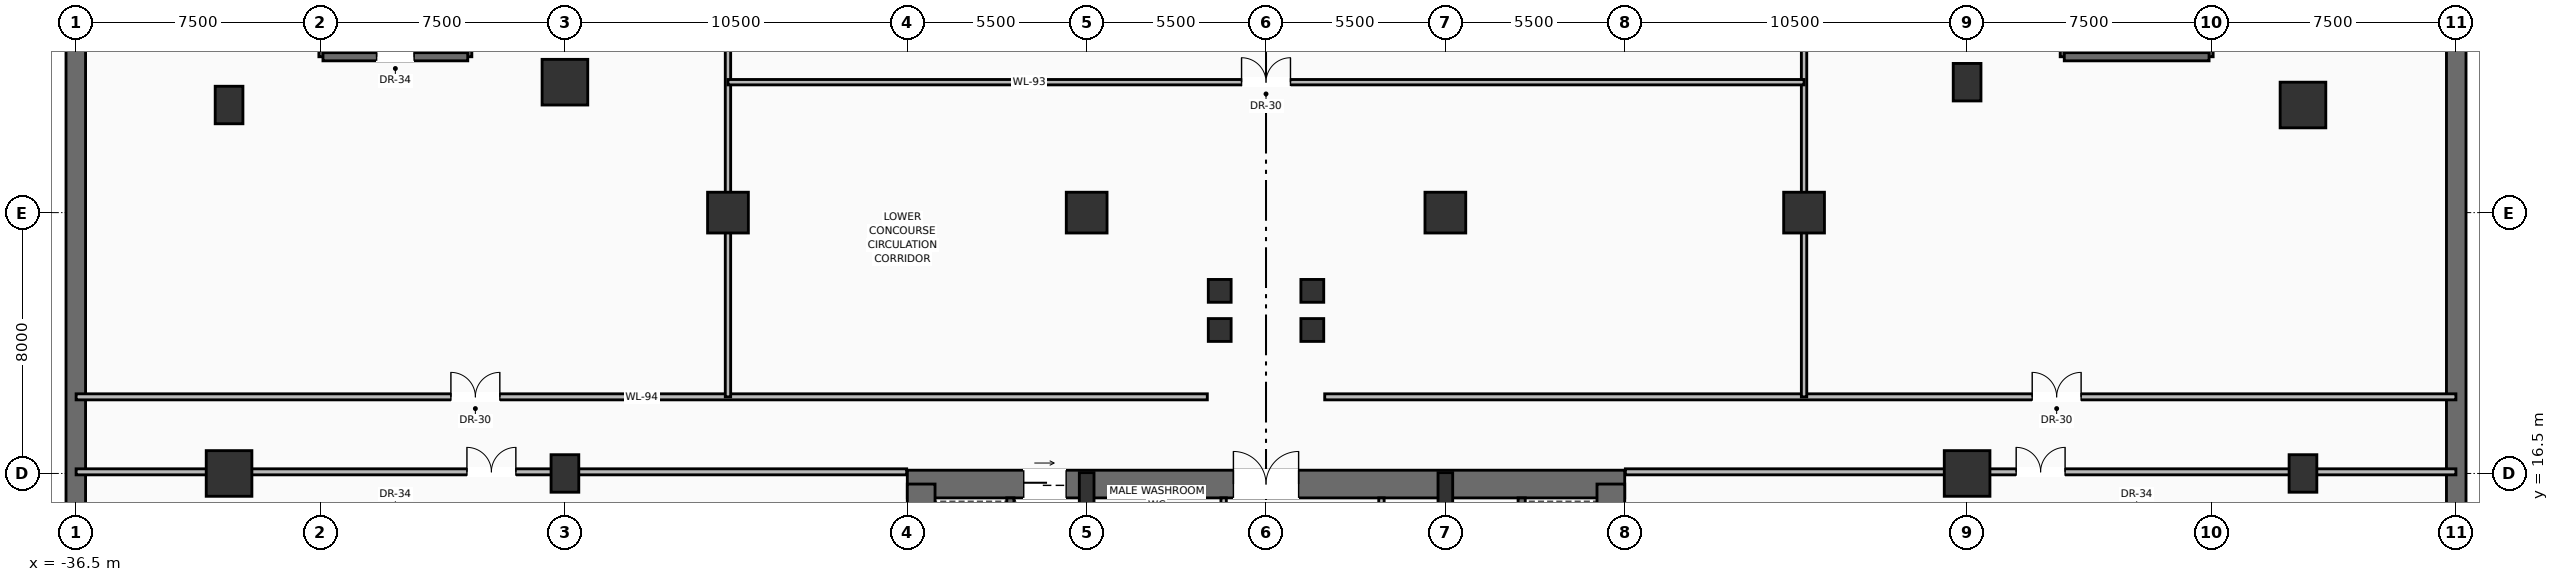
"""IFC4 building model, lengths in metres.
Left out: names, types, materials, properties, quantities, classifications, styles, units other than length and angle.
Written with IfcOpenShell. Run it as: python <this file> out.ifc"""

import sys

from ifc_helpers import new_model, si_unit, direction, frame, frame_2d, origin, origin_2d, place, context, subcontext, project, spatial, rectangle, hollow_rectangle, extrude, source, transform, mapped, element, fill, save


model = new_model("IFC4")
c1 = context("Model", 3, precision=1e-05, world=origin(), true_north=direction((0.0, 1.0)))
c2 = subcontext(c1, "Body", "Model", "MODEL_VIEW")
j1 = project(units=[si_unit("LENGTHUNIT", "METRE"), si_unit("PLANEANGLEUNIT", "RADIAN")], contexts=[c1])
p1 = place(None, origin())
s1 = spatial("IfcSite", under=j1, at=p1, CompositionType="ELEMENT")
p2 = place(p1, origin())
s2 = spatial("IfcBuilding", under=s1, at=p2, CompositionType="ELEMENT")
p3 = place(p2, frame((0.0, 0.0, -5.0)))
s3 = spatial("IfcBuildingStorey", under=s2, at=p3, CompositionType="ELEMENT", Elevation=-5.0)
for number, where, z_axis, x_axis in (
    (1, (36.5, 4.0, 0.0), (0.0, 0.0, 1.0), (0.0, 1.0, 0.0)),
    (2, (-36.5, 46.0, 0.0), (0.0, 0.0, 1.0), (0.0, -1.0, 0.0)),
):
    element("IfcWall", number, at=place(p3, frame(where, z_axis=z_axis, x_axis=x_axis)), inside=s3, PredefinedType="SOLIDWALL", context=c2, shape_type="SweptSolid", body=[
        extrude(rectangle(XDim=42.0, YDim=0.6, at=frame_2d((21.0, 0.0))), origin(), (0.0, 0.0, 1.0), 4.64),
    ])
p4 = place(p3, frame((-11.0, 16.175, 0.0), z_axis=(0.0, 0.0, 1.0), x_axis=(1.0, 0.0, 0.0)))
e3 = element("IfcWall", 3, at=p4, inside=s3, PredefinedType="SHEAR", context=c2, shape_type="SweptSolid", body=[
    extrude(rectangle(XDim=22.0, YDim=0.85, at=frame_2d((11.0, 0.0))), origin(), (0.0, 0.0, 1.0), 4.64),
])
p5 = place(p4, frame((3.57, 0.0, 0.0)))
e4 = element("IfcOpeningElement", 4, at=p5, cuts=e3, PredefinedType="OPENING", context=c2, shape_type="SweptSolid", body=[
    extrude(rectangle(XDim=1.3, YDim=2.3, at=frame_2d((0.65, 1.15))), frame((0.0, 0.435, 0.0), z_axis=(0.0, -1.0, 0.0), x_axis=(1.0, 0.0, 0.0)), (0.0, 0.0, 1.0), 0.87),
])
p6 = place(p4, frame((10.0, 0.0, 0.0)))
e5 = element("IfcOpeningElement", 5, at=p6, cuts=e3, PredefinedType="OPENING", context=c2, shape_type="SweptSolid", body=[
    extrude(rectangle(XDim=2.0, YDim=2.4, at=frame_2d((1.0, 1.2))), frame((0.0, 0.435, 0.0), z_axis=(0.0, -1.0, 0.0), x_axis=(1.0, 0.0, 0.0)), (0.0, 0.0, 1.0), 0.87),
])
for number, where, z_axis, x_axis in (
    (6, (-10.575, 0.425, 0.0), (0.0, 0.0, 1.0), (0.0, 1.0, 0.0)),
    (7, (10.575, 0.425, 0.0), (0.0, 0.0, 1.0), (0.0, 1.0, 0.0)),
):
    element("IfcWall", number, at=place(p3, frame(where, z_axis=z_axis, x_axis=x_axis)), inside=s3, PredefinedType="SHEAR", context=c2, shape_type="SweptSolid", body=[
        extrude(rectangle(XDim=15.75, YDim=0.85, at=frame_2d((7.875, 0.0))), origin(), (0.0, 0.0, 1.0), 4.64),
    ])
p7 = place(p3, frame((-5.5, 0.425, 0.0), z_axis=(0.0, 0.0, 1.0), x_axis=(0.0, 1.0, 0.0)))
e8 = element("IfcWall", 8, at=p7, inside=s3, PredefinedType="SHEAR", context=c2, shape_type="SweptSolid", body=[
    extrude(rectangle(XDim=15.75, YDim=0.4, at=frame_2d((7.875, 0.0))), origin(), (0.0, 0.0, 1.0), 4.64),
])
p8 = place(p7, frame((9.075, 0.0, 0.0)))
e9 = element("IfcOpeningElement", 9, at=p8, cuts=e8, PredefinedType="OPENING", context=c2, shape_type="SweptSolid", body=[
    extrude(rectangle(XDim=1.1, YDim=2.2, at=frame_2d((0.55, 1.1))), frame((0.0, 0.21, 0.0), z_axis=(0.0, -1.0, 0.0), x_axis=(1.0, 0.0, 0.0)), (0.0, 0.0, 1.0), 0.42),
])
p9 = place(p3, frame((5.5, 0.425, 0.0), z_axis=(0.0, 0.0, 1.0), x_axis=(0.0, 1.0, 0.0)))
e10 = element("IfcWall", 10, at=p9, inside=s3, PredefinedType="SHEAR", context=c2, shape_type="SweptSolid", body=[
    extrude(rectangle(XDim=15.75, YDim=0.4, at=frame_2d((7.875, 0.0))), origin(), (0.0, 0.0, 1.0), 4.64),
])
p10 = place(p9, frame((9.075, 0.0, 0.0)))
e11 = element("IfcOpeningElement", 11, at=p10, cuts=e10, PredefinedType="OPENING", context=c2, shape_type="SweptSolid", body=[
    extrude(rectangle(XDim=1.1, YDim=2.2, at=frame_2d((0.55, 1.1))), frame((0.0, 0.21, 0.0), z_axis=(0.0, -1.0, 0.0), x_axis=(1.0, 0.0, 0.0)), (0.0, 0.0, 1.0), 0.42),
])
m1 = source(origin(), c2, "Body", "SweptSolid", [
    extrude(rectangle(XDim=0.45, YDim=0.95, at=origin_2d()), origin(), (0.0, 0.0, 1.0), 5.0),
])
for number, where, z_axis, x_axis in (
    (12, (-5.5, 16.05, 0.0), (0.0, 0.0, 1.0), (1.0, 0.0, 0.0)),
    (13, (5.5, 16.05, 0.0), (0.0, 0.0, 1.0), (1.0, 0.0, 0.0)),
):
    element("IfcColumn", number, at=place(p3, frame(where, z_axis=z_axis, x_axis=x_axis)), inside=s3, PredefinedType="PILASTER", context=c2, shape_type="MappedRepresentation", body=[
        mapped(m1, transform((0.0, 0.0, 0.0), scale=1.0)),
    ])
m2 = source(origin(), c2, "Body", "SweptSolid", [
    extrude(hollow_rectangle(XDim=0.7, YDim=0.7, WallThickness=0.036, at=origin_2d()), origin(), (0.0, 0.0, 1.0), 5.0),
])
for number, where, z_axis, x_axis in (
    (14, (-1.42, 20.9, 0.0), (0.0, 0.0, 1.0), (1.0, 0.0, 0.0)),
    (15, (1.42, 20.9, 0.0), (0.0, 0.0, 1.0), (1.0, 0.0, 0.0)),
    (16, (-1.42, 22.1, 0.0), (0.0, 0.0, 1.0), (1.0, 0.0, 0.0)),
    (17, (1.42, 22.1, 0.0), (0.0, 0.0, 1.0), (1.0, 0.0, 0.0)),
):
    element("IfcColumn", number, at=place(p3, frame(where, z_axis=z_axis, x_axis=x_axis)), inside=s3, PredefinedType="COLUMN", context=c2, shape_type="MappedRepresentation", body=[
        mapped(m2, transform((0.0, 0.0, 0.0), scale=1.0)),
    ])
m3 = source(origin(), c2, "Body", "SweptSolid", [
    extrude(hollow_rectangle(XDim=1.4, YDim=1.4, WallThickness=0.07, at=origin_2d()), origin(), (0.0, 0.0, 1.0), 5.0),
])
p11 = place(p3, frame((-31.8, 16.5, 0.0), z_axis=(0.0, 0.0, 1.0), x_axis=(1.0, 0.0, 0.0)))
e18 = element("IfcColumn", 18, at=p11, inside=s3, PredefinedType="COLUMN", context=c2, shape_type="MappedRepresentation", body=[
    mapped(m3, transform((0.0, 0.0, 0.0), scale=1.0)),
])
m4 = source(origin(), c2, "Body", "SweptSolid", [
    extrude(rectangle(XDim=0.85, YDim=1.15, at=origin_2d()), origin(), (0.0, 0.0, 1.0), 5.0),
])
p12 = place(p3, frame((31.8, 16.5, 0.0), z_axis=(0.0, 0.0, 1.0), x_axis=(1.0, 0.0, 0.0)))
e19 = element("IfcColumn", 19, at=p12, inside=s3, PredefinedType="COLUMN", context=c2, shape_type="MappedRepresentation", body=[
    mapped(m4, transform((0.0, 0.0, 0.0), scale=1.0)),
])
p13 = place(p3, frame((-21.5, 28.5, 0.0), z_axis=(0.0, 0.0, 1.0), x_axis=(1.0, 0.0, 0.0)))
e20 = element("IfcColumn", 20, at=p13, inside=s3, PredefinedType="COLUMN", context=c2, shape_type="MappedRepresentation", body=[
    mapped(m3, transform((0.0, 0.0, 0.0), scale=1.0)),
])
for number, where, z_axis, x_axis in (
    (21, (21.5, 28.5, 0.0), (0.0, 0.0, 1.0), (1.0, 0.0, 0.0)),
    (22, (-21.5, 16.5, 0.0), (0.0, 0.0, 1.0), (1.0, 0.0, 0.0)),
):
    element("IfcColumn", number, at=place(p3, frame(where, z_axis=z_axis, x_axis=x_axis)), inside=s3, PredefinedType="COLUMN", context=c2, shape_type="MappedRepresentation", body=[
        mapped(m4, transform((0.0, 0.0, 0.0), scale=1.0)),
    ])
p14 = place(p3, frame((21.5, 16.5, 0.0), z_axis=(0.0, 0.0, 1.0), x_axis=(1.0, 0.0, 0.0)))
e23 = element("IfcColumn", 23, at=p14, inside=s3, PredefinedType="COLUMN", context=c2, shape_type="MappedRepresentation", body=[
    mapped(m3, transform((0.0, 0.0, 0.0), scale=1.0)),
])
p15 = place(p3, frame((-31.8, 27.8, 0.0), z_axis=(0.0, 0.0, 1.0), x_axis=(1.0, 0.0, 0.0)))
e24 = element("IfcColumn", 24, at=p15, inside=s3, PredefinedType="COLUMN", context=c2, shape_type="MappedRepresentation", body=[
    mapped(m4, transform((0.0, 0.0, 0.0), scale=1.0)),
])
p16 = place(p3, frame((31.8, 27.8, 0.0), z_axis=(0.0, 0.0, 1.0), x_axis=(1.0, 0.0, 0.0)))
e25 = element("IfcColumn", 25, at=p16, inside=s3, PredefinedType="COLUMN", context=c2, shape_type="MappedRepresentation", body=[
    mapped(m3, transform((0.0, 0.0, 0.0), scale=1.0)),
])
m5 = source(origin(), c2, "Body", "SweptSolid", [
    extrude(rectangle(XDim=1.25, YDim=1.25, at=origin_2d()), origin(), (0.0, 0.0, 1.0), 5.0),
])
for number, where, z_axis, x_axis in (
    (26, (-5.5, 24.5, 0.0), (0.0, 0.0, 1.0), (1.0, 0.0, 0.0)),
    (27, (5.5, 24.5, 0.0), (0.0, 0.0, 1.0), (1.0, 0.0, 0.0)),
):
    element("IfcColumn", number, at=place(p3, frame(where, z_axis=z_axis, x_axis=x_axis)), inside=s3, PredefinedType="COLUMN", context=c2, shape_type="MappedRepresentation", body=[
        mapped(m5, transform((0.0, 0.0, 0.0), scale=1.0)),
    ])
m6 = source(origin(), c2, "Body", "SweptSolid", [
    extrude(rectangle(XDim=1.25, YDim=1.25, at=origin_2d()), origin(), (0.0, 0.0, 1.0), 4.64),
])
for number, where, z_axis, x_axis in (
    (28, (-16.5, 24.5, 0.0), (0.0, 0.0, 1.0), (1.0, 0.0, 0.0)),
    (29, (16.5, 24.5, 0.0), (0.0, 0.0, 1.0), (1.0, 0.0, 0.0)),
):
    element("IfcColumn", number, at=place(p3, frame(where, z_axis=z_axis, x_axis=x_axis)), inside=s3, PredefinedType="COLUMN", context=c2, shape_type="MappedRepresentation", body=[
        mapped(m6, transform((0.0, 0.0, 0.0), scale=1.0)),
    ])
for number, where, z_axis, x_axis in (
    (30, (-7.84, 11.87, 0.0), (0.0, 0.0, 1.0), (0.0, 1.0, 0.0)),
    (31, (7.84, 11.87, 0.0), (0.0, 0.0, 1.0), (0.0, 1.0, 0.0)),
):
    element("IfcWall", number, at=place(p3, frame(where, z_axis=z_axis, x_axis=x_axis)), inside=s3, PredefinedType="SOLIDWALL", context=c2, shape_type="SweptSolid", body=[
        extrude(rectangle(XDim=3.88, YDim=0.22, at=frame_2d((1.94, 0.0))), origin(), (0.0, 0.0, 1.0), 4.64),
    ])
p17 = place(p3, frame((-1.3, 13.6, 0.0), z_axis=(0.0, 0.0, 1.0), x_axis=(0.0, 1.0, 0.0)))
e32 = element("IfcWall", 32, at=p17, inside=s3, PredefinedType="PARTITIONING", context=c2, shape_type="SweptSolid", body=[
    extrude(rectangle(XDim=2.15, YDim=0.165, at=frame_2d((1.075, 0.0))), origin(), (0.0, 0.0, 1.0), 4.632),
])
p18 = place(p17, frame((0.55, 0.0, 0.0)))
e33 = element("IfcOpeningElement", 33, at=p18, cuts=e32, PredefinedType="OPENING", context=c2, shape_type="SweptSolid", body=[
    extrude(rectangle(XDim=0.9, YDim=2.1, at=frame_2d((0.45, 1.05))), frame((0.0, 0.093, 0.0), z_axis=(0.0, -1.0, 0.0), x_axis=(1.0, 0.0, 0.0)), (0.0, 0.0, 1.0), 0.185),
])
p19 = place(p3, frame((3.54, 11.22, 0.0), z_axis=(0.0, 0.0, 1.0), x_axis=(0.0, 1.0, 0.0)))
e34 = element("IfcWall", 34, at=p19, inside=s3, PredefinedType="PARTITIONING", context=c2, shape_type="SweptSolid", body=[
    extrude(rectangle(XDim=4.53, YDim=0.165, at=frame_2d((2.265, 0.0))), origin(), (0.0, 0.0, 1.0), 4.632),
])
p20 = place(p19, frame((1.25, 0.0, 0.0)))
e35 = element("IfcOpeningElement", 35, at=p20, cuts=e34, PredefinedType="OPENING", context=c2, shape_type="SweptSolid", body=[
    extrude(rectangle(XDim=0.9, YDim=2.1, at=frame_2d((0.45, 1.05))), frame((0.0, 0.093, 0.0), z_axis=(0.0, -1.0, 0.0), x_axis=(1.0, 0.0, 0.0)), (0.0, 0.0, 1.0), 0.185),
])
for number, where, z_axis, x_axis in (
    (36, (-28.92, 29.28, 0.0), (0.0, 0.0, 1.0), (0.0, 1.0, 0.0)),
    (37, (-24.48, 29.28, 0.0), (0.0, 0.0, 1.0), (0.0, 1.0, 0.0)),
):
    element("IfcWall", number, at=place(p3, frame(where, z_axis=z_axis, x_axis=x_axis)), inside=s3, PredefinedType="SOLIDWALL", context=c2, shape_type="SweptSolid", body=[
        extrude(rectangle(XDim=8.44, YDim=0.25, at=frame_2d((4.22, 0.0))), origin(), (0.0, 0.0, 1.0), 4.64),
    ])
p21 = place(p3, frame((-28.92, 29.28, 0.0), z_axis=(0.0, 0.0, 1.0), x_axis=(1.0, 0.0, 0.0)))
e38 = element("IfcWall", 38, at=p21, inside=s3, PredefinedType="SOLIDWALL", context=c2, shape_type="SweptSolid", body=[
    extrude(rectangle(XDim=4.44, YDim=0.25, at=frame_2d((2.22, 0.0))), origin(), (0.0, 0.0, 1.0), 4.64),
])
p22 = place(p21, frame((1.645, 0.0, 0.0)))
e39 = element("IfcOpeningElement", 39, at=p22, cuts=e38, PredefinedType="OPENING", context=c2, shape_type="SweptSolid", body=[
    extrude(rectangle(XDim=1.15, YDim=2.2, at=frame_2d((0.575, 1.1))), frame((0.0, 0.135, 0.0), z_axis=(0.0, -1.0, 0.0), x_axis=(1.0, 0.0, 0.0)), (0.0, 0.0, 1.0), 0.27),
])
for number, where, z_axis, x_axis in (
    (40, (24.48, 29.28, 0.0), (0.0, 0.0, 1.0), (0.0, 1.0, 0.0)),
    (41, (28.92, 29.28, 0.0), (0.0, 0.0, 1.0), (0.0, 1.0, 0.0)),
):
    element("IfcWall", number, at=place(p3, frame(where, z_axis=z_axis, x_axis=x_axis)), inside=s3, PredefinedType="SOLIDWALL", context=c2, shape_type="SweptSolid", body=[
        extrude(rectangle(XDim=8.44, YDim=0.25, at=frame_2d((4.22, 0.0))), origin(), (0.0, 0.0, 1.0), 4.64),
    ])
p23 = place(p3, frame((24.48, 29.28, 0.0), z_axis=(0.0, 0.0, 1.0), x_axis=(1.0, 0.0, 0.0)))
e42 = element("IfcWall", 42, at=p23, inside=s3, PredefinedType="SOLIDWALL", context=c2, shape_type="SweptSolid", body=[
    extrude(rectangle(XDim=4.44, YDim=0.25, at=frame_2d((2.22, 0.0))), origin(), (0.0, 0.0, 1.0), 4.64),
])
p24 = place(p3, frame((-36.49, 16.55, 0.0), z_axis=(0.0, 0.0, 1.0), x_axis=(1.0, 0.0, 0.0)))
e43 = element("IfcWall", 43, at=p24, inside=s3, PredefinedType="PARTITIONING", context=c2, shape_type="SweptSolid", body=[
    extrude(rectangle(XDim=25.47, YDim=0.185, at=frame_2d((12.735, 0.0))), origin(), (0.0, 0.0, 1.0), 3.592),
])
p25 = place(p24, frame((11.985, 0.0, 0.0)))
e44 = element("IfcOpeningElement", 44, at=p25, cuts=e43, PredefinedType="OPENING", context=c2, shape_type="SweptSolid", body=[
    extrude(rectangle(XDim=1.5, YDim=2.25, at=frame_2d((0.75, 1.125))), frame((0.0, 0.103, 0.0), z_axis=(0.0, -1.0, 0.0), x_axis=(1.0, 0.0, 0.0)), (0.0, 0.0, 1.0), 0.205),
])
p26 = place(p3, frame((11.02, 16.55, 0.0), z_axis=(0.0, 0.0, 1.0), x_axis=(1.0, 0.0, 0.0)))
e45 = element("IfcWall", 45, at=p26, inside=s3, PredefinedType="PARTITIONING", context=c2, shape_type="SweptSolid", body=[
    extrude(rectangle(XDim=25.47, YDim=0.185, at=frame_2d((12.735, 0.0))), origin(), (0.0, 0.0, 1.0), 3.592),
])
p27 = place(p26, frame((11.985, 0.0, 0.0)))
e46 = element("IfcOpeningElement", 46, at=p27, cuts=e45, PredefinedType="OPENING", context=c2, shape_type="SweptSolid", body=[
    extrude(rectangle(XDim=1.5, YDim=2.25, at=frame_2d((0.75, 1.125))), frame((0.0, 0.103, 0.0), z_axis=(0.0, -1.0, 0.0), x_axis=(1.0, 0.0, 0.0)), (0.0, 0.0, 1.0), 0.205),
])
p28 = place(p3, frame((-36.49, 18.85, 0.0), z_axis=(0.0, 0.0, 1.0), x_axis=(1.0, 0.0, 0.0)))
e47 = element("IfcWall", 47, at=p28, inside=s3, PredefinedType="PARTITIONING", context=c2, shape_type="SweptSolid", body=[
    extrude(rectangle(XDim=34.69, YDim=0.185, at=frame_2d((17.345, 0.0))), origin(), (0.0, 0.0, 1.0), 3.592),
])
p29 = place(p28, frame((11.493, 0.0, 0.0)))
e48 = element("IfcOpeningElement", 48, at=p29, cuts=e47, PredefinedType="OPENING", context=c2, shape_type="SweptSolid", body=[
    extrude(rectangle(XDim=1.5, YDim=2.25, at=frame_2d((0.75, 1.125))), frame((0.0, 0.103, 0.0), z_axis=(0.0, -1.0, 0.0), x_axis=(1.0, 0.0, 0.0)), (0.0, 0.0, 1.0), 0.205),
])
p30 = place(p3, frame((1.8, 18.85, 0.0), z_axis=(0.0, 0.0, 1.0), x_axis=(1.0, 0.0, 0.0)))
e49 = element("IfcWall", 49, at=p30, inside=s3, PredefinedType="PARTITIONING", context=c2, shape_type="SweptSolid", body=[
    extrude(rectangle(XDim=34.69, YDim=0.185, at=frame_2d((17.345, 0.0))), origin(), (0.0, 0.0, 1.0), 3.592),
])
p31 = place(p30, frame((21.697, 0.0, 0.0)))
e50 = element("IfcOpeningElement", 50, at=p31, cuts=e49, PredefinedType="OPENING", context=c2, shape_type="SweptSolid", body=[
    extrude(rectangle(XDim=1.5, YDim=2.25, at=frame_2d((0.75, 1.125))), frame((0.0, 0.103, 0.0), z_axis=(0.0, -1.0, 0.0), x_axis=(1.0, 0.0, 0.0)), (0.0, 0.0, 1.0), 0.205),
])
p32 = place(p3, frame((-16.5, 18.85, 0.0), z_axis=(0.0, 0.0, 1.0), x_axis=(0.0, 1.0, 0.0)))
e51 = element("IfcWall", 51, at=p32, inside=s3, PredefinedType="PARTITIONING", context=c2, shape_type="SweptSolid", body=[
    extrude(rectangle(XDim=31.14, YDim=0.165, at=frame_2d((15.57, 0.0))), origin(), (0.0, 0.0, 1.0), 3.592),
])
p33 = place(p32, frame((14.45, 0.0, 0.0)))
e52 = element("IfcOpeningElement", 52, at=p33, cuts=e51, PredefinedType="OPENING", context=c2, shape_type="SweptSolid", body=[
    extrude(rectangle(XDim=1.5, YDim=2.25, at=frame_2d((0.75, 1.125))), frame((0.0, 0.093, 0.0), z_axis=(0.0, -1.0, 0.0), x_axis=(1.0, 0.0, 0.0)), (0.0, 0.0, 1.0), 0.185),
])
p34 = place(p3, frame((16.5, 18.85, 0.0), z_axis=(0.0, 0.0, 1.0), x_axis=(0.0, 1.0, 0.0)))
e53 = element("IfcWall", 53, at=p34, inside=s3, PredefinedType="PARTITIONING", context=c2, shape_type="SweptSolid", body=[
    extrude(rectangle(XDim=31.14, YDim=0.165, at=frame_2d((15.57, 0.0))), origin(), (0.0, 0.0, 1.0), 3.592),
])
p35 = place(p34, frame((14.45, 0.0, 0.0)))
e54 = element("IfcOpeningElement", 54, at=p35, cuts=e53, PredefinedType="OPENING", context=c2, shape_type="SweptSolid", body=[
    extrude(rectangle(XDim=1.5, YDim=2.25, at=frame_2d((0.75, 1.125))), frame((0.0, 0.093, 0.0), z_axis=(0.0, -1.0, 0.0), x_axis=(1.0, 0.0, 0.0)), (0.0, 0.0, 1.0), 0.185),
])
p36 = place(p3, frame((-16.5, 28.5, 0.0), z_axis=(0.0, 0.0, 1.0), x_axis=(1.0, 0.0, 0.0)))
e55 = element("IfcWall", 55, at=p36, inside=s3, PredefinedType="PARTITIONING", context=c2, shape_type="SweptSolid", body=[
    extrude(rectangle(XDim=33.0, YDim=0.165, at=frame_2d((16.5, 0.0))), origin(), (0.0, 0.0, 1.0), 3.592),
])
p37 = place(p36, frame((15.75, 0.0, 0.0)))
e56 = element("IfcOpeningElement", 56, at=p37, cuts=e55, PredefinedType="OPENING", context=c2, shape_type="SweptSolid", body=[
    extrude(rectangle(XDim=1.5, YDim=2.25, at=frame_2d((0.75, 1.125))), frame((0.0, 0.093, 0.0), z_axis=(0.0, -1.0, 0.0), x_axis=(1.0, 0.0, 0.0)), (0.0, 0.0, 1.0), 0.185),
])
m7 = source(origin(), c2, "Body", "SweptSolid", [
    extrude(rectangle(XDim=1.3, YDim=2.3, at=frame_2d((0.65, 1.15))), frame((0.0, 0.025, 0.0), z_axis=(0.0, -1.0, 0.0), x_axis=(1.0, 0.0, 0.0)), (0.0, 0.0, 1.0), 0.05),
])
p38 = place(p5, origin())
e57 = element("IfcDoor", 57, at=p38, inside=s3, OperationType="SLIDING_TO_RIGHT", PredefinedType="DOOR", context=c2, shape_type="MappedRepresentation", body=[
    mapped(m7, transform((0.0, 0.0, 0.0), scale=1.0)),
])
fill(e4, e57)
m8 = source(origin(), c2, "Body", "SweptSolid", [
    extrude(rectangle(XDim=2.0, YDim=2.4, at=frame_2d((1.0, 1.2))), frame((0.0, 0.025, 0.0), z_axis=(0.0, -1.0, 0.0), x_axis=(1.0, 0.0, 0.0)), (0.0, 0.0, 1.0), 0.05),
])
p39 = place(p6, origin())
e58 = element("IfcDoor", 58, at=p39, inside=s3, OperationType="DOUBLE_DOOR_SINGLE_SWING", PredefinedType="DOOR", context=c2, shape_type="MappedRepresentation", body=[
    mapped(m8, transform((0.0, 0.0, 0.0), scale=1.0)),
])
fill(e5, e58)
m9 = source(origin(), c2, "Body", "SweptSolid", [
    extrude(rectangle(XDim=1.15, YDim=2.2, at=frame_2d((0.575, 1.1))), frame((0.0, 0.025, 0.0), z_axis=(0.0, -1.0, 0.0), x_axis=(1.0, 0.0, 0.0)), (0.0, 0.0, 1.0), 0.05),
])
p40 = place(p22, origin())
e59 = element("IfcDoor", 59, at=p40, inside=s3, OperationType="SINGLE_SWING_LEFT", PredefinedType="DOOR", context=c2, shape_type="MappedRepresentation", body=[
    mapped(m9, transform((0.0, 0.0, 0.0), scale=1.0)),
])
fill(e39, e59)
m10 = source(origin(), c2, "Body", "SweptSolid", [
    extrude(rectangle(XDim=1.5, YDim=2.25, at=frame_2d((0.75, 1.125))), frame((0.0, 0.025, 0.0), z_axis=(0.0, -1.0, 0.0), x_axis=(1.0, 0.0, 0.0)), (0.0, 0.0, 1.0), 0.05),
])
p41 = place(p25, origin())
e60 = element("IfcDoor", 60, at=p41, inside=s3, OperationType="DOUBLE_DOOR_SINGLE_SWING", PredefinedType="DOOR", context=c2, shape_type="MappedRepresentation", body=[
    mapped(m10, transform((0.0, 0.0, 0.0), scale=1.0)),
])
fill(e44, e60)
p42 = place(p27, origin())
e61 = element("IfcDoor", 61, at=p42, inside=s3, OperationType="DOUBLE_DOOR_SINGLE_SWING", PredefinedType="DOOR", context=c2, shape_type="MappedRepresentation", body=[
    mapped(m10, transform((0.0, 0.0, 0.0), scale=1.0)),
])
fill(e46, e61)
p43 = place(p29, origin())
e62 = element("IfcDoor", 62, at=p43, inside=s3, OperationType="DOUBLE_DOOR_SINGLE_SWING", PredefinedType="DOOR", context=c2, shape_type="MappedRepresentation", body=[
    mapped(m10, transform((0.0, 0.0, 0.0), scale=1.0)),
])
fill(e48, e62)
p44 = place(p31, origin())
e63 = element("IfcDoor", 63, at=p44, inside=s3, OperationType="DOUBLE_DOOR_SINGLE_SWING", PredefinedType="DOOR", context=c2, shape_type="MappedRepresentation", body=[
    mapped(m10, transform((0.0, 0.0, 0.0), scale=1.0)),
])
fill(e50, e63)
p45 = place(p37, origin())
e64 = element("IfcDoor", 64, at=p45, inside=s3, OperationType="DOUBLE_DOOR_SINGLE_SWING", PredefinedType="DOOR", context=c2, shape_type="MappedRepresentation", body=[
    mapped(m10, transform((0.0, 0.0, 0.0), scale=1.0)),
])
fill(e56, e64)
save(model, sys.argv[1])
